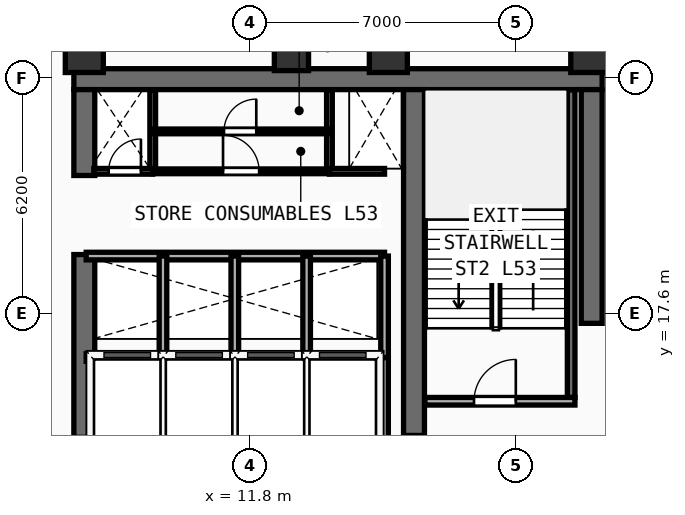
"""IFC4 building model, lengths in metres.
Left out: names, types, materials, properties, quantities, classifications, styles, units other than length and angle.
Written with IfcOpenShell. Run it as: python <this file> out.ifc"""

import sys

from ifc_helpers import new_model, si_unit, direction, frame, frame_2d, origin, origin_2d, place, context, subcontext, project, spatial, rectangle, extrude, element, fill, save


model = new_model("IFC4")
c1 = context("Model", 3, precision=1e-05, world=origin(), true_north=direction((0.0, 1.0)))
c2 = subcontext(c1, "Body", "Model", "MODEL_VIEW")
j1 = project(units=[si_unit("LENGTHUNIT", "METRE"), si_unit("PLANEANGLEUNIT", "RADIAN")], contexts=[c1])
p1 = place(None, origin())
s1 = spatial("IfcSite", under=j1, at=p1, CompositionType="ELEMENT")
p2 = place(p1, origin())
s2 = spatial("IfcBuilding", under=s1, at=p2, CompositionType="ELEMENT")
p3 = place(p2, frame((0.0, 0.0, 208.3)))
s3 = spatial("IfcBuildingStorey", under=s2, at=p3, CompositionType="ELEMENT", Elevation=208.3)
p4 = place(p3, frame((7.175, 23.775, 0.0), z_axis=(0.0, 0.0, 1.0), x_axis=(1.0, 0.0, 0.0)))
e1 = element("IfcWall", 1, at=p4, inside=s3, PredefinedType="SHEAR", context=c2, shape_type="SweptSolid", body=[
    extrude(rectangle(XDim=13.9, YDim=0.55, at=frame_2d((6.95, 0.0))), origin(), (0.0, 0.0, 1.0), 3.56),
])
p5 = place(p3, frame((7.45, 14.35, 0.0), z_axis=(0.0, 0.0, 1.0), x_axis=(0.0, 1.0, 0.0)))
e2 = element("IfcWall", 2, at=p5, inside=s3, PredefinedType="SHEAR", context=c2, shape_type="SweptSolid", body=[
    extrude(rectangle(XDim=4.81, YDim=0.55, at=frame_2d((2.405, 0.0))), origin(), (0.0, 0.0, 1.0), 3.56),
])
p6 = place(p3, frame((7.45, 21.24, 0.0), z_axis=(0.0, 0.0, 1.0), x_axis=(0.0, 1.0, 0.0)))
e3 = element("IfcWall", 3, at=p6, inside=s3, PredefinedType="SHEAR", context=c2, shape_type="SweptSolid", body=[
    extrude(rectangle(XDim=2.26, YDim=0.55, at=frame_2d((1.13, 0.0))), origin(), (0.0, 0.0, 1.0), 3.56),
])
p7 = place(p3, frame((20.8, 17.35, 0.0), z_axis=(0.0, 0.0, 1.0), x_axis=(0.0, 1.0, 0.0)))
e4 = element("IfcWall", 4, at=p7, inside=s3, PredefinedType="SHEAR", context=c2, shape_type="SweptSolid", body=[
    extrude(rectangle(XDim=6.15, YDim=0.55, at=frame_2d((3.075, 0.0))), origin(), (0.0, 0.0, 1.0), 3.56),
])
p8 = place(p3, frame((16.125, 14.4, 0.0), z_axis=(0.0, 0.0, 1.0), x_axis=(0.0, 1.0, 0.0)))
e5 = element("IfcWall", 5, at=p8, inside=s3, PredefinedType="SHEAR", context=c2, shape_type="SweptSolid", body=[
    extrude(rectangle(XDim=9.1, YDim=0.55, at=frame_2d((4.55, 0.0))), origin(), (0.0, 0.0, 1.0), 3.56),
])
for number, where, z_axis, x_axis in (
    (6, (7.45, 24.45, 0.0), (0.0, 0.0, 1.0), (1.0, 0.0, 0.0)),
    (7, (15.45, 24.45, 0.0), (0.0, 0.0, 1.0), (1.0, 0.0, 0.0)),
    (8, (20.75, 24.45, 0.0), (0.0, 0.0, 1.0), (1.0, 0.0, 0.0)),
):
    element("IfcColumn", number, at=place(p3, frame(where, z_axis=z_axis, x_axis=x_axis)), inside=s3, PredefinedType="COLUMN", context=c2, shape_type="SweptSolid", body=[
        extrude(rectangle(XDim=1.0, YDim=1.0, at=origin_2d()), origin(), (0.0, 0.0, 1.0), 3.56),
    ])
p9 = place(p3, frame((12.9, 24.45, 0.0), z_axis=(0.0, 0.0, 1.0), x_axis=(1.0, 0.0, 0.0)))
e9 = element("IfcColumn", 9, at=p9, inside=s3, PredefinedType="COLUMN", context=c2, shape_type="SweptSolid", body=[
    extrude(rectangle(XDim=0.9, YDim=0.9, at=origin_2d()), origin(), (0.0, 0.0, 1.0), 3.56),
])
p10 = place(p3, frame((27.685, 19.775, 0.0), z_axis=(0.0, 0.0, 1.0), x_axis=(-0.707106781187, 0.707106781187, 0.0)))
e10 = element("IfcWall", 10, at=p10, inside=s3, PredefinedType="SOLIDWALL", context=c2, shape_type="SweptSolid", body=[
    extrude(rectangle(XDim=9.207, YDim=0.28, at=frame_2d((4.603, 0.0))), origin(), (0.0, 0.0, 1.0), 3.56),
])
p11 = place(p3, frame((20.26, 15.4, 0.0), z_axis=(0.0, 0.0, 1.0), x_axis=(0.0, 1.0, 0.0)))
e11 = element("IfcWall", 11, at=p11, inside=s3, PredefinedType="SHEAR", context=c2, shape_type="SweptSolid", body=[
    extrude(rectangle(XDim=8.09, YDim=0.2, at=frame_2d((4.045, 0.0))), origin(), (0.0, 0.0, 1.0), 3.56),
])
p12 = place(p3, frame((16.41, 15.3, 0.0), z_axis=(0.0, 0.0, 1.0), x_axis=(1.0, 0.0, 0.0)))
e12 = element("IfcWall", 12, at=p12, inside=s3, PredefinedType="PARTITIONING", context=c2, shape_type="SweptSolid", body=[
    extrude(rectangle(XDim=3.95, YDim=0.2, at=frame_2d((1.975, 0.0))), origin(), (0.0, 0.0, 1.0), 3.56),
])
p13 = place(p12, frame((1.294, 0.0, 0.0)))
e13 = element("IfcOpeningElement", 13, at=p13, cuts=e12, PredefinedType="OPENING", context=c2, shape_type="SweptSolid", body=[
    extrude(rectangle(XDim=1.1, YDim=2.2, at=frame_2d((0.55, 1.1))), frame((0.0, 0.11, 0.0), z_axis=(0.0, -1.0, 0.0), x_axis=(1.0, 0.0, 0.0)), (0.0, 0.0, 1.0), 0.22),
])
p14 = place(p3, frame((7.5, 16.45, 0.0), z_axis=(0.0, 0.0, 1.0), x_axis=(1.0, 0.0, 0.0)))
e14 = element("IfcWall", 14, at=p14, inside=s3, PredefinedType="PARTITIONING", context=c2, shape_type="SweptSolid", body=[
    extrude(rectangle(XDim=7.85, YDim=0.2, at=frame_2d((3.925, 0.0))), origin(), (0.0, 0.0, 1.0), 3.56),
])
for number, where, z_axis, x_axis in (
    (15, (15.35, 14.22, 0.0), (0.0, 0.0, 1.0), (0.0, 1.0, 0.0)),
    (16, (9.52, 14.22, 0.0), (0.0, 0.0, 1.0), (0.0, 1.0, 0.0)),
    (17, (11.41, 14.22, 0.0), (0.0, 0.0, 1.0), (0.0, 1.0, 0.0)),
    (18, (13.3, 14.22, 0.0), (0.0, 0.0, 1.0), (0.0, 1.0, 0.0)),
):
    element("IfcWall", number, at=place(p3, frame(where, z_axis=z_axis, x_axis=x_axis)), inside=s3, PredefinedType="PARTITIONING", context=c2, shape_type="SweptSolid", body=[
        extrude(rectangle(XDim=2.23, YDim=0.2, at=frame_2d((1.115, 0.0))), origin(), (0.0, 0.0, 1.0), 3.56),
    ])
p15 = place(p3, frame((7.5, 19.12, 0.0), z_axis=(0.0, 0.0, 1.0), x_axis=(1.0, 0.0, 0.0)))
e19 = element("IfcWall", 19, at=p15, inside=s3, PredefinedType="PARTITIONING", context=c2, shape_type="SweptSolid", body=[
    extrude(rectangle(XDim=7.85, YDim=0.2, at=frame_2d((3.925, 0.0))), origin(), (0.0, 0.0, 1.0), 3.56),
])
for number, where, z_axis, x_axis in (
    (20, (15.35, 16.45, 0.0), (0.0, 0.0, 1.0), (0.0, 1.0, 0.0)),
    (21, (9.52, 16.45, 0.0), (0.0, 0.0, 1.0), (0.0, 1.0, 0.0)),
    (22, (11.41, 16.45, 0.0), (0.0, 0.0, 1.0), (0.0, 1.0, 0.0)),
    (23, (13.3, 16.45, 0.0), (0.0, 0.0, 1.0), (0.0, 1.0, 0.0)),
):
    element("IfcWall", number, at=place(p3, frame(where, z_axis=z_axis, x_axis=x_axis)), inside=s3, PredefinedType="PARTITIONING", context=c2, shape_type="SweptSolid", body=[
        extrude(rectangle(XDim=2.67, YDim=0.2, at=frame_2d((1.335, 0.0))), origin(), (0.0, 0.0, 1.0), 3.56),
    ])
for number, where, z_axis, x_axis in (
    (24, (9.25, 21.35, 0.0), (0.0, 0.0, 1.0), (0.0, 1.0, 0.0)),
    (25, (13.9, 21.35, 0.0), (0.0, 0.0, 1.0), (0.0, 1.0, 0.0)),
):
    element("IfcWall", number, at=place(p3, frame(where, z_axis=z_axis, x_axis=x_axis)), inside=s3, PredefinedType="PARTITIONING", context=c2, shape_type="SweptSolid", body=[
        extrude(rectangle(XDim=2.13, YDim=0.15, at=frame_2d((1.065, 0.0))), origin(), (0.0, 0.0, 1.0), 3.56),
    ])
p16 = place(p3, frame((7.7, 21.35, 0.0), z_axis=(0.0, 0.0, 1.0), x_axis=(1.0, 0.0, 0.0)))
e26 = element("IfcWall", 26, at=p16, inside=s3, PredefinedType="PARTITIONING", context=c2, shape_type="SweptSolid", body=[
    extrude(rectangle(XDim=1.55, YDim=0.15, at=frame_2d((0.775, 0.0))), origin(), (0.0, 0.0, 1.0), 3.56),
])
p17 = place(p16, frame((0.39, 0.0, 0.0)))
e27 = element("IfcOpeningElement", 27, at=p17, cuts=e26, PredefinedType="OPENING", context=c2, shape_type="SweptSolid", body=[
    extrude(rectangle(XDim=0.85, YDim=2.15, at=frame_2d((0.425, 1.075))), frame((0.0, 0.085, 0.0), z_axis=(0.0, -1.0, 0.0), x_axis=(1.0, 0.0, 0.0)), (0.0, 0.0, 1.0), 0.17),
])
p18 = place(p3, frame((13.9, 21.35, 0.0), z_axis=(0.0, 0.0, 1.0), x_axis=(1.0, 0.0, 0.0)))
e28 = element("IfcWall", 28, at=p18, inside=s3, PredefinedType="PARTITIONING", context=c2, shape_type="SweptSolid", body=[
    extrude(rectangle(XDim=1.45, YDim=0.15, at=frame_2d((0.725, 0.0))), origin(), (0.0, 0.0, 1.0), 3.56),
])
p19 = place(p3, frame((9.25, 21.35, 0.0), z_axis=(0.0, 0.0, 1.0), x_axis=(1.0, 0.0, 0.0)))
e29 = element("IfcWall", 29, at=p19, inside=s3, PredefinedType="PARTITIONING", context=c2, shape_type="SweptSolid", body=[
    extrude(rectangle(XDim=4.65, YDim=0.125, at=frame_2d((2.325, 0.0))), origin(), (0.0, 0.0, 1.0), 3.56),
])
p20 = place(p19, frame((1.85, 0.0, 0.0)))
e30 = element("IfcOpeningElement", 30, at=p20, cuts=e29, PredefinedType="OPENING", context=c2, shape_type="SweptSolid", body=[
    extrude(rectangle(XDim=0.95, YDim=2.15, at=frame_2d((0.475, 1.075))), frame((0.0, 0.073, 0.0), z_axis=(0.0, -1.0, 0.0), x_axis=(1.0, 0.0, 0.0)), (0.0, 0.0, 1.0), 0.145),
])
p21 = place(p3, frame((9.25, 22.4, 0.0), z_axis=(0.0, 0.0, 1.0), x_axis=(1.0, 0.0, 0.0)))
e31 = element("IfcWall", 31, at=p21, inside=s3, PredefinedType="PARTITIONING", context=c2, shape_type="SweptSolid", body=[
    extrude(rectangle(XDim=4.65, YDim=0.125, at=frame_2d((2.325, 0.0))), origin(), (0.0, 0.0, 1.0), 3.56),
])
p22 = place(p21, frame((1.875, 0.0, 0.0)))
e32 = element("IfcOpeningElement", 32, at=p22, cuts=e31, PredefinedType="OPENING", context=c2, shape_type="SweptSolid", body=[
    extrude(rectangle(XDim=0.85, YDim=2.15, at=frame_2d((0.425, 1.075))), frame((0.0, 0.073, 0.0), z_axis=(0.0, -1.0, 0.0), x_axis=(1.0, 0.0, 0.0)), (0.0, 0.0, 1.0), 0.145),
])
p23 = place(p13, origin())
e33 = element("IfcDoor", 33, at=p23, inside=s3, OperationType="SINGLE_SWING_RIGHT", PredefinedType="DOOR", context=c2, shape_type="SweptSolid", body=[
    extrude(rectangle(XDim=1.1, YDim=2.2, at=frame_2d((0.55, 1.1))), frame((0.0, 0.025, 0.0), z_axis=(0.0, -1.0, 0.0), x_axis=(1.0, 0.0, 0.0)), (0.0, 0.0, 1.0), 0.05),
])
fill(e13, e33)
p24 = place(p17, origin())
e34 = element("IfcDoor", 34, at=p24, inside=s3, OperationType="SINGLE_SWING_RIGHT", PredefinedType="DOOR", context=c2, shape_type="SweptSolid", body=[
    extrude(rectangle(XDim=0.85, YDim=2.15, at=frame_2d((0.425, 1.075))), frame((0.0, 0.025, 0.0), z_axis=(0.0, -1.0, 0.0), x_axis=(1.0, 0.0, 0.0)), (0.0, 0.0, 1.0), 0.05),
])
fill(e27, e34)
p25 = place(p20, origin())
e35 = element("IfcDoor", 35, at=p25, inside=s3, OperationType="SINGLE_SWING_LEFT", PredefinedType="DOOR", context=c2, shape_type="SweptSolid", body=[
    extrude(rectangle(XDim=0.95, YDim=2.15, at=frame_2d((0.475, 1.075))), frame((0.0, 0.025, 0.0), z_axis=(0.0, -1.0, 0.0), x_axis=(1.0, 0.0, 0.0)), (0.0, 0.0, 1.0), 0.05),
])
fill(e30, e35)
p26 = place(p22, origin())
e36 = element("IfcDoor", 36, at=p26, inside=s3, OperationType="SINGLE_SWING_RIGHT", PredefinedType="DOOR", context=c2, shape_type="SweptSolid", body=[
    extrude(rectangle(XDim=0.85, YDim=2.15, at=frame_2d((0.425, 1.075))), frame((0.0, 0.025, 0.0), z_axis=(0.0, -1.0, 0.0), x_axis=(1.0, 0.0, 0.0)), (0.0, 0.0, 1.0), 0.05),
])
fill(e32, e36)
save(model, sys.argv[1])
